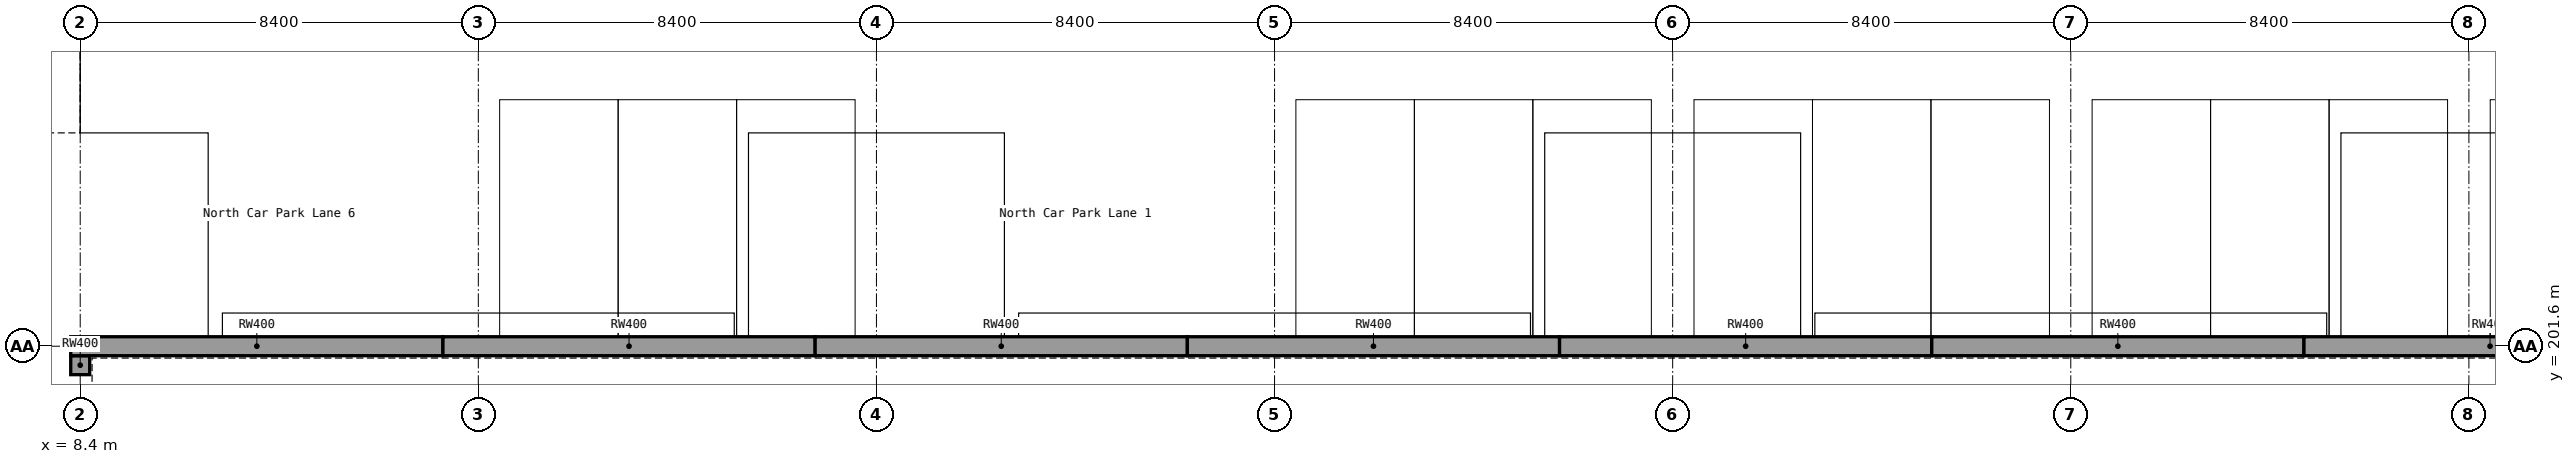
"""IFC4 building model, lengths in metres.
Left out: names, types, materials, properties, quantities, classifications, styles, units other than length and angle.
Written with IfcOpenShell. Run it as: python <this file> out.ifc"""

import sys

from ifc_helpers import new_model, si_unit, direction, frame, frame_2d, origin, place, context, subcontext, project, spatial, rectangle, extrude, element, save


model = new_model("IFC4")
c1 = context("Model", 3, precision=1e-05, world=origin(), true_north=direction((0.0, 1.0)))
c2 = subcontext(c1, "Body", "Model", "MODEL_VIEW")
j1 = project(units=[si_unit("LENGTHUNIT", "METRE"), si_unit("PLANEANGLEUNIT", "RADIAN")], contexts=[c1])
p1 = place(None, origin())
s1 = spatial("IfcSite", under=j1, at=p1, CompositionType="ELEMENT")
p2 = place(p1, origin())
s2 = spatial("IfcBuilding", under=s1, at=p2, CompositionType="ELEMENT")
p3 = place(p2, frame((0.0, 0.0, -3.0)))
s3 = spatial("IfcBuildingStorey", under=s2, at=p3, CompositionType="ELEMENT", Elevation=-3.0)
p4 = place(p3, frame((8.4, 201.0, 0.0), z_axis=(0.0, 0.0, 1.0), x_axis=(0.0, 1.0, 0.0)))
e1 = element("IfcWall", 1, at=p4, inside=s3, PredefinedType="SOLIDWALL", context=c2, shape_type="SweptSolid", body=[
    extrude(rectangle(XDim=0.4, YDim=0.4, at=frame_2d((0.2, 0.0))), origin(), (0.0, 0.0, 1.0), 3.0),
])
p5 = place(p3, frame((8.2, 201.6, 0.0), z_axis=(0.0, 0.0, 1.0), x_axis=(1.0, 0.0, 0.0)))
e2 = element("IfcWall", 2, at=p5, inside=s3, PredefinedType="SOLIDWALL", context=c2, shape_type="SweptSolid", body=[
    extrude(rectangle(XDim=7.853, YDim=0.4, at=frame_2d((3.927, 0.0))), origin(), (0.0, 0.0, 1.0), 3.0),
])
p6 = place(p3, frame((16.053, 201.6, 0.0), z_axis=(0.0, 0.0, 1.0), x_axis=(1.0, 0.0, 0.0)))
e3 = element("IfcWall", 3, at=p6, inside=s3, PredefinedType="SOLIDWALL", context=c2, shape_type="SweptSolid", body=[
    extrude(rectangle(XDim=7.854, YDim=0.4, at=frame_2d((3.927, 0.0))), origin(), (0.0, 0.0, 1.0), 3.0),
])
for number, where, z_axis, x_axis in (
    (4, (23.907, 201.6, 0.0), (0.0, 0.0, 1.0), (1.0, 0.0, 0.0)),
    (5, (31.76, 201.6, 0.0), (0.0, 0.0, 1.0), (1.0, 0.0, 0.0)),
):
    element("IfcWall", number, at=place(p3, frame(where, z_axis=z_axis, x_axis=x_axis)), inside=s3, PredefinedType="SOLIDWALL", context=c2, shape_type="SweptSolid", body=[
        extrude(rectangle(XDim=7.853, YDim=0.4, at=frame_2d((3.927, 0.0))), origin(), (0.0, 0.0, 1.0), 3.0),
    ])
p7 = place(p3, frame((39.613, 201.6, 0.0), z_axis=(0.0, 0.0, 1.0), x_axis=(1.0, 0.0, 0.0)))
e6 = element("IfcWall", 6, at=p7, inside=s3, PredefinedType="SOLIDWALL", context=c2, shape_type="SweptSolid", body=[
    extrude(rectangle(XDim=7.854, YDim=0.4, at=frame_2d((3.927, 0.0))), origin(), (0.0, 0.0, 1.0), 3.0),
])
for number, where, z_axis, x_axis in (
    (7, (47.467, 201.6, 0.0), (0.0, 0.0, 1.0), (1.0, 0.0, 0.0)),
    (8, (55.32, 201.6, 0.0), (0.0, 0.0, 1.0), (1.0, 0.0, 0.0)),
):
    element("IfcWall", number, at=place(p3, frame(where, z_axis=z_axis, x_axis=x_axis)), inside=s3, PredefinedType="SOLIDWALL", context=c2, shape_type="SweptSolid", body=[
        extrude(rectangle(XDim=7.853, YDim=0.4, at=frame_2d((3.927, 0.0))), origin(), (0.0, 0.0, 1.0), 3.0),
    ])
save(model, sys.argv[1])
